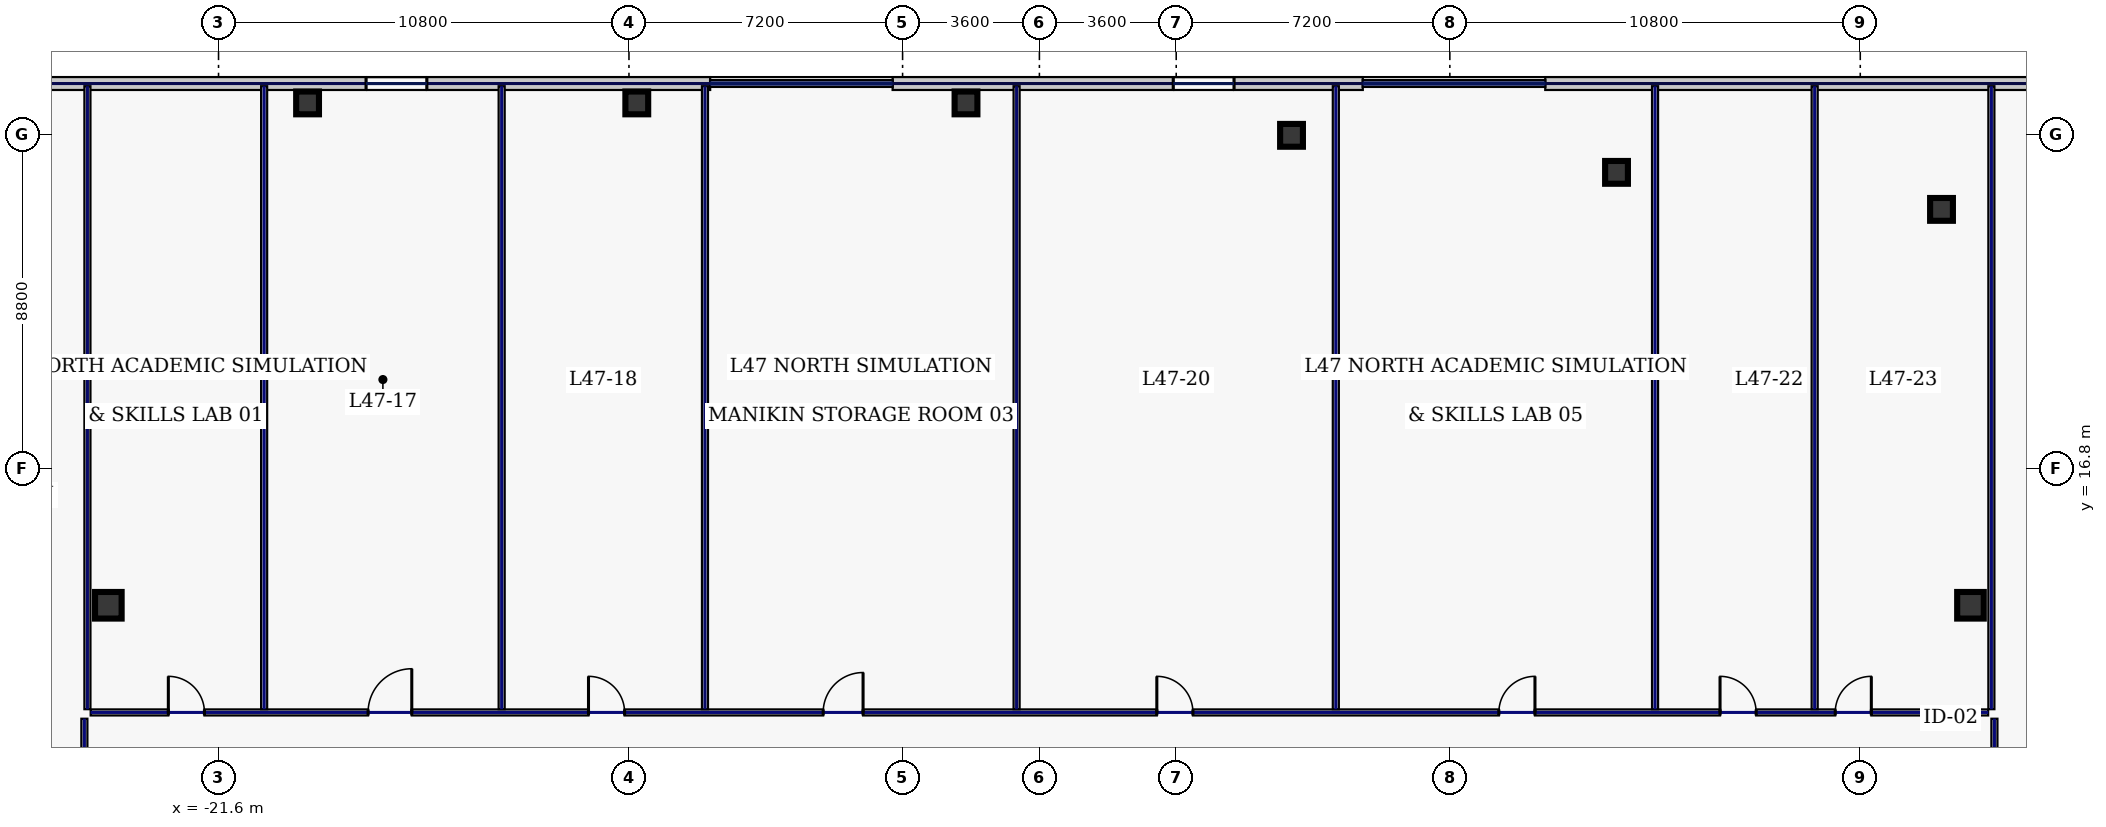
"""IFC4 building model, lengths in metres.
Left out: names, types, materials, properties, quantities, classifications, styles, units other than length and angle.
Written with IfcOpenShell. Run it as: python <this file> out.ifc"""

import sys

from ifc_helpers import new_model, si_unit, direction, frame, frame_2d, origin, origin_2d, place, context, subcontext, project, spatial, rectangle, hollow_rectangle, extrude, element, fill, save


model = new_model("IFC4")
c1 = context("Model", 3, precision=1e-05, world=origin(), true_north=direction((0.0, 1.0)))
c2 = subcontext(c1, "Body", "Model", "MODEL_VIEW")
j1 = project(units=[si_unit("LENGTHUNIT", "METRE"), si_unit("PLANEANGLEUNIT", "RADIAN")], contexts=[c1])
p1 = place(None, origin())
s1 = spatial("IfcSite", under=j1, at=p1, CompositionType="ELEMENT")
p2 = place(p1, origin())
s2 = spatial("IfcBuilding", under=s1, at=p2, CompositionType="ELEMENT")
p3 = place(p2, frame((0.0, 0.0, 204.2)))
s3 = spatial("IfcBuildingStorey", under=s2, at=p3, CompositionType="ELEMENT", Elevation=204.2)
for number, where, z_axis, x_axis in (
    (1, (-24.5, 13.2, 0.0), (0.0, 0.0, 1.0), (1.0, 0.0, 0.0)),
    (2, (24.5, 13.2, 0.0), (0.0, 0.0, 1.0), (1.0, 0.0, 0.0)),
):
    element("IfcColumn", number, at=place(p3, frame(where, z_axis=z_axis, x_axis=x_axis)), inside=s3, PredefinedType="COLUMN", context=c2, shape_type="SweptSolid", body=[
        extrude(hollow_rectangle(XDim=0.7, YDim=0.7, WallThickness=0.032, at=origin_2d()), origin(), (0.0, 0.0, 1.0), 3.68),
    ])
for number, where, z_axis, x_axis in (
    (3, (23.738, 23.618, 0.0), (0.0, 0.0, 1.0), (1.0, 0.0, 0.0)),
    (4, (15.186, 24.592, 0.0), (0.0, 0.0, 1.0), (1.0, 0.0, 0.0)),
    (5, (6.634, 25.567, 0.0), (0.0, 0.0, 1.0), (1.0, 0.0, 0.0)),
    (6, (-1.931, 26.42, 0.0), (0.0, 0.0, 1.0), (1.0, 0.0, 0.0)),
    (7, (-10.594, 26.42, 0.0), (0.0, 0.0, 1.0), (1.0, 0.0, 0.0)),
    (8, (-19.257, 26.42, 0.0), (0.0, 0.0, 1.0), (1.0, 0.0, 0.0)),
):
    element("IfcColumn", number, at=place(p3, frame(where, z_axis=z_axis, x_axis=x_axis)), inside=s3, PredefinedType="COLUMN", context=c2, shape_type="SweptSolid", body=[
        extrude(hollow_rectangle(XDim=0.6, YDim=0.6, WallThickness=0.028, at=origin_2d()), origin(), (0.0, 0.0, 1.0), 3.68),
    ])
p4 = place(p3, frame((33.4, 26.93, 0.0), z_axis=(0.0, 0.0, 1.0), x_axis=(-1.0, 0.0, 0.0)))
e9 = element("IfcWall", 9, at=p4, inside=s3, PredefinedType="STANDARD", context=c2, shape_type="SweptSolid", body=[
    extrude(rectangle(XDim=20.09, YDim=0.34, at=frame_2d((10.045, 0.0))), origin(), (0.0, 0.0, 1.0), 2.075),
])
p5 = place(p4, frame((2.691, 0.0, 0.22)))
e10 = element("IfcOpeningElement", 10, at=p5, cuts=e9, PredefinedType="OPENING", context=c2, shape_type="SweptSolid", body=[
    extrude(rectangle(XDim=1.6, YDim=1.2, at=frame_2d((0.8, 0.6))), frame((0.0, 0.18, 0.0), z_axis=(0.0, -1.0, 0.0), x_axis=(1.0, 0.0, 0.0)), (0.0, 0.0, 1.0), 0.36),
])
p6 = place(p3, frame((8.51, 26.93, 0.0), z_axis=(0.0, 0.0, 1.0), x_axis=(-1.0, 0.0, 0.0)))
e11 = element("IfcWall", 11, at=p6, inside=s3, PredefinedType="STANDARD", context=c2, shape_type="SweptSolid", body=[
    extrude(rectangle(XDim=12.373, YDim=0.34, at=frame_2d((6.187, 0.0))), origin(), (0.0, 0.0, 1.0), 2.075),
])
p7 = place(p6, frame((3.389, 0.0, 0.22)))
e12 = element("IfcOpeningElement", 12, at=p7, cuts=e11, PredefinedType="OPENING", context=c2, shape_type="SweptSolid", body=[
    extrude(rectangle(XDim=1.6, YDim=1.2, at=frame_2d((0.8, 0.6))), frame((0.0, 0.18, 0.0), z_axis=(0.0, -1.0, 0.0), x_axis=(1.0, 0.0, 0.0)), (0.0, 0.0, 1.0), 0.36),
])
p8 = place(p3, frame((-8.663, 26.93, 0.0), z_axis=(0.0, 0.0, 1.0), x_axis=(-1.0, 0.0, 0.0)))
e13 = element("IfcWall", 13, at=p8, inside=s3, PredefinedType="STANDARD", context=c2, shape_type="SweptSolid", body=[
    extrude(rectangle(XDim=19.937, YDim=0.34, at=frame_2d((9.969, 0.0))), origin(), (0.0, 0.0, 1.0), 3.68),
])
p9 = place(p8, frame((7.455, 0.0, 0.22)))
e14 = element("IfcOpeningElement", 14, at=p9, cuts=e13, PredefinedType="OPENING", context=c2, shape_type="SweptSolid", body=[
    extrude(rectangle(XDim=1.6, YDim=1.2, at=frame_2d((0.8, 0.6))), frame((0.0, 0.18, 0.0), z_axis=(0.0, -1.0, 0.0), x_axis=(1.0, 0.0, 0.0)), (0.0, 0.0, 1.0), 0.36),
])
p10 = place(p3, frame((-25.13, 2.585, 0.0), z_axis=(0.0, 0.0, 1.0), x_axis=(0.0, 1.0, 0.0)))
e15 = element("IfcWall", 15, at=p10, inside=s3, PredefinedType="PARTITIONING", context=c2, shape_type="SweptSolid", body=[
    extrude(rectangle(XDim=7.63, YDim=0.16, at=frame_2d((3.815, 0.0))), origin(), (0.0, 0.0, 1.0), 3.68),
])
p11 = place(p10, frame((2.345, 0.0, 0.0)))
e16 = element("IfcOpeningElement", 16, at=p11, cuts=e15, PredefinedType="OPENING", context=c2, shape_type="SweptSolid", body=[
    extrude(rectangle(XDim=0.95, YDim=2.2, at=frame_2d((0.475, 1.1))), frame((0.0, 0.09, 0.0), z_axis=(0.0, -1.0, 0.0), x_axis=(1.0, 0.0, 0.0)), (0.0, 0.0, 1.0), 0.18),
])
p12 = place(p3, frame((-24.965, 10.38, 0.0), z_axis=(0.0, 0.0, 1.0), x_axis=(1.0, 0.0, 0.0)))
e17 = element("IfcWall", 17, at=p12, inside=s3, PredefinedType="PARTITIONING", context=c2, shape_type="SweptSolid", body=[
    extrude(rectangle(XDim=49.93, YDim=0.16, at=frame_2d((24.965, 0.0))), origin(), (0.0, 0.0, 1.0), 3.68),
])
p13 = place(p12, frame((2.044, 0.0, 0.0)))
e18 = element("IfcOpeningElement", 18, at=p13, cuts=e17, PredefinedType="OPENING", context=c2, shape_type="SweptSolid", body=[
    extrude(rectangle(XDim=0.95, YDim=2.2, at=frame_2d((0.475, 1.1))), frame((0.0, 0.09, 0.0), z_axis=(0.0, -1.0, 0.0), x_axis=(1.0, 0.0, 0.0)), (0.0, 0.0, 1.0), 0.18),
])
p14 = place(p12, frame((7.3, 0.0, 0.0)))
e19 = element("IfcOpeningElement", 19, at=p14, cuts=e17, PredefinedType="OPENING", context=c2, shape_type="SweptSolid", body=[
    extrude(rectangle(XDim=1.15, YDim=2.2, at=frame_2d((0.575, 1.1))), frame((0.0, 0.09, 0.0), z_axis=(0.0, -1.0, 0.0), x_axis=(1.0, 0.0, 0.0)), (0.0, 0.0, 1.0), 0.18),
])
p15 = place(p12, frame((13.1, 0.0, 0.0)))
e20 = element("IfcOpeningElement", 20, at=p15, cuts=e17, PredefinedType="OPENING", context=c2, shape_type="SweptSolid", body=[
    extrude(rectangle(XDim=0.95, YDim=2.2, at=frame_2d((0.475, 1.1))), frame((0.0, 0.09, 0.0), z_axis=(0.0, -1.0, 0.0), x_axis=(1.0, 0.0, 0.0)), (0.0, 0.0, 1.0), 0.18),
])
p16 = place(p12, frame((19.275, 0.0, 0.0)))
e21 = element("IfcOpeningElement", 21, at=p16, cuts=e17, PredefinedType="OPENING", context=c2, shape_type="SweptSolid", body=[
    extrude(rectangle(XDim=1.05, YDim=2.2, at=frame_2d((0.525, 1.1))), frame((0.0, 0.09, 0.0), z_axis=(0.0, -1.0, 0.0), x_axis=(1.0, 0.0, 0.0)), (0.0, 0.0, 1.0), 0.18),
])
p17 = place(p12, frame((28.055, 0.0, 0.0)))
e22 = element("IfcOpeningElement", 22, at=p17, cuts=e17, PredefinedType="OPENING", context=c2, shape_type="SweptSolid", body=[
    extrude(rectangle(XDim=0.95, YDim=2.2, at=frame_2d((0.475, 1.1))), frame((0.0, 0.09, 0.0), z_axis=(0.0, -1.0, 0.0), x_axis=(1.0, 0.0, 0.0)), (0.0, 0.0, 1.0), 0.18),
])
p18 = place(p12, frame((37.055, 0.0, 0.0)))
e23 = element("IfcOpeningElement", 23, at=p18, cuts=e17, PredefinedType="OPENING", context=c2, shape_type="SweptSolid", body=[
    extrude(rectangle(XDim=0.95, YDim=2.2, at=frame_2d((0.475, 1.1))), frame((0.0, 0.09, 0.0), z_axis=(0.0, -1.0, 0.0), x_axis=(1.0, 0.0, 0.0)), (0.0, 0.0, 1.0), 0.18),
])
p19 = place(p12, frame((42.875, 0.0, 0.0)))
e24 = element("IfcOpeningElement", 24, at=p19, cuts=e17, PredefinedType="OPENING", context=c2, shape_type="SweptSolid", body=[
    extrude(rectangle(XDim=0.95, YDim=2.2, at=frame_2d((0.475, 1.1))), frame((0.0, 0.09, 0.0), z_axis=(0.0, -1.0, 0.0), x_axis=(1.0, 0.0, 0.0)), (0.0, 0.0, 1.0), 0.18),
])
p20 = place(p12, frame((45.906, 0.0, 0.0)))
e25 = element("IfcOpeningElement", 25, at=p20, cuts=e17, PredefinedType="OPENING", context=c2, shape_type="SweptSolid", body=[
    extrude(rectangle(XDim=0.95, YDim=2.2, at=frame_2d((0.475, 1.1))), frame((0.0, 0.09, 0.0), z_axis=(0.0, -1.0, 0.0), x_axis=(1.0, 0.0, 0.0)), (0.0, 0.0, 1.0), 0.18),
])
p21 = place(p3, frame((25.13, 10.215, 0.0), z_axis=(0.0, 0.0, 1.0), x_axis=(0.0, -1.0, 0.0)))
e26 = element("IfcWall", 26, at=p21, inside=s3, PredefinedType="PARTITIONING", context=c2, shape_type="SweptSolid", body=[
    extrude(rectangle(XDim=2.98, YDim=0.16, at=frame_2d((1.49, 0.0))), origin(), (0.0, 0.0, 1.0), 3.68),
])
p22 = place(p21, frame((1.1, 0.0, 0.0)))
e27 = element("IfcOpeningElement", 27, at=p22, cuts=e26, PredefinedType="OPENING", context=c2, shape_type="SweptSolid", body=[
    extrude(rectangle(XDim=0.95, YDim=2.2, at=frame_2d((0.475, 1.1))), frame((0.0, 0.09, 0.0), z_axis=(0.0, -1.0, 0.0), x_axis=(1.0, 0.0, 0.0)), (0.0, 0.0, 1.0), 0.18),
])
p23 = place(p3, frame((-25.05, 10.465, 0.0), z_axis=(0.0, 0.0, 1.0), x_axis=(0.0, 1.0, 0.0)))
e28 = element("IfcWall", 28, at=p23, inside=s3, PredefinedType="PARTITIONING", context=c2, shape_type="SweptSolid", body=[
    extrude(rectangle(XDim=16.395, YDim=0.16, at=frame_2d((8.198, 0.0))), origin(), (0.0, 0.0, 1.0), 1.475),
])
for number, where, z_axis, x_axis in (
    (29, (25.05, 10.465, 0.0), (0.0, 0.0, 1.0), (0.0, 1.0, 0.0)),
    (30, (-20.4, 10.465, 0.0), (0.0, 0.0, 1.0), (0.0, 1.0, 0.0)),
):
    element("IfcWall", number, at=place(p3, frame(where, z_axis=z_axis, x_axis=x_axis)), inside=s3, PredefinedType="PARTITIONING", context=c2, shape_type="SweptSolid", body=[
        extrude(rectangle(XDim=16.395, YDim=0.16, at=frame_2d((8.198, 0.0))), origin(), (0.0, 0.0, 1.0), 3.68),
    ])
for number, where, z_axis, x_axis in (
    (31, (-8.8, 10.465, 0.0), (0.0, 0.0, 1.0), (0.0, 1.0, 0.0)),
    (32, (-0.6, 10.465, 0.0), (0.0, 0.0, 1.0), (0.0, 1.0, 0.0)),
):
    element("IfcWall", number, at=place(p3, frame(where, z_axis=z_axis, x_axis=x_axis)), inside=s3, PredefinedType="PARTITIONING", context=c2, shape_type="SweptSolid", body=[
        extrude(rectangle(XDim=16.395, YDim=0.16, at=frame_2d((8.198, 0.0))), origin(), (0.0, 0.0, 1.0), 1.475),
    ])
for number, where, z_axis, x_axis in (
    (33, (7.8, 10.465, 0.0), (0.0, 0.0, 1.0), (0.0, 1.0, 0.0)),
    (34, (16.2, 10.465, 0.0), (0.0, 0.0, 1.0), (0.0, 1.0, 0.0)),
    (35, (20.4, 10.465, 0.0), (0.0, 0.0, 1.0), (0.0, 1.0, 0.0)),
    (36, (-14.15, 10.465, 0.0), (0.0, 0.0, 1.0), (0.0, 1.0, 0.0)),
):
    element("IfcWall", number, at=place(p3, frame(where, z_axis=z_axis, x_axis=x_axis)), inside=s3, PredefinedType="PARTITIONING", context=c2, shape_type="SweptSolid", body=[
        extrude(rectangle(XDim=16.395, YDim=0.16, at=frame_2d((8.198, 0.0))), origin(), (0.0, 0.0, 1.0), 3.68),
    ])
p24 = place(p7, origin())
e37 = element("IfcWindow", 37, at=p24, inside=s3, PartitioningType="SINGLE_PANEL", PredefinedType="WINDOW", context=c2, shape_type="SweptSolid", body=[
    extrude(rectangle(XDim=1.6, YDim=1.2, at=frame_2d((0.8, 0.6))), frame((0.0, 0.03, 0.0), z_axis=(0.0, -1.0, 0.0), x_axis=(1.0, 0.0, 0.0)), (0.0, 0.0, 1.0), 0.06),
])
fill(e12, e37)
p25 = place(p9, origin())
e38 = element("IfcWindow", 38, at=p25, inside=s3, PartitioningType="SINGLE_PANEL", PredefinedType="WINDOW", context=c2, shape_type="SweptSolid", body=[
    extrude(rectangle(XDim=1.6, YDim=1.2, at=frame_2d((0.8, 0.6))), frame((0.0, 0.03, 0.0), z_axis=(0.0, -1.0, 0.0), x_axis=(1.0, 0.0, 0.0)), (0.0, 0.0, 1.0), 0.06),
])
fill(e14, e38)
p26 = place(p13, origin())
e39 = element("IfcDoor", 39, at=p26, inside=s3, OperationType="SINGLE_SWING_LEFT", PredefinedType="DOOR", context=c2, shape_type="SweptSolid", body=[
    extrude(rectangle(XDim=0.95, YDim=2.2, at=frame_2d((0.475, 1.1))), frame((0.0, 0.025, 0.0), z_axis=(0.0, -1.0, 0.0), x_axis=(1.0, 0.0, 0.0)), (0.0, 0.0, 1.0), 0.05),
])
fill(e18, e39)
p27 = place(p14, origin())
e40 = element("IfcDoor", 40, at=p27, inside=s3, OperationType="SINGLE_SWING_RIGHT", PredefinedType="DOOR", context=c2, shape_type="SweptSolid", body=[
    extrude(rectangle(XDim=1.15, YDim=2.2, at=frame_2d((0.575, 1.1))), frame((0.0, 0.025, 0.0), z_axis=(0.0, -1.0, 0.0), x_axis=(1.0, 0.0, 0.0)), (0.0, 0.0, 1.0), 0.05),
])
fill(e19, e40)
p28 = place(p15, origin())
e41 = element("IfcDoor", 41, at=p28, inside=s3, OperationType="SINGLE_SWING_LEFT", PredefinedType="DOOR", context=c2, shape_type="SweptSolid", body=[
    extrude(rectangle(XDim=0.95, YDim=2.2, at=frame_2d((0.475, 1.1))), frame((0.0, 0.025, 0.0), z_axis=(0.0, -1.0, 0.0), x_axis=(1.0, 0.0, 0.0)), (0.0, 0.0, 1.0), 0.05),
])
fill(e20, e41)
p29 = place(p16, origin())
e42 = element("IfcDoor", 42, at=p29, inside=s3, OperationType="SINGLE_SWING_RIGHT", PredefinedType="DOOR", context=c2, shape_type="SweptSolid", body=[
    extrude(rectangle(XDim=1.05, YDim=2.2, at=frame_2d((0.525, 1.1))), frame((0.0, 0.025, 0.0), z_axis=(0.0, -1.0, 0.0), x_axis=(1.0, 0.0, 0.0)), (0.0, 0.0, 1.0), 0.05),
])
fill(e21, e42)
p30 = place(p17, origin())
e43 = element("IfcDoor", 43, at=p30, inside=s3, OperationType="SINGLE_SWING_LEFT", PredefinedType="DOOR", context=c2, shape_type="SweptSolid", body=[
    extrude(rectangle(XDim=0.95, YDim=2.2, at=frame_2d((0.475, 1.1))), frame((0.0, 0.025, 0.0), z_axis=(0.0, -1.0, 0.0), x_axis=(1.0, 0.0, 0.0)), (0.0, 0.0, 1.0), 0.05),
])
fill(e22, e43)
p31 = place(p18, origin())
e44 = element("IfcDoor", 44, at=p31, inside=s3, OperationType="SINGLE_SWING_RIGHT", PredefinedType="DOOR", context=c2, shape_type="SweptSolid", body=[
    extrude(rectangle(XDim=0.95, YDim=2.2, at=frame_2d((0.475, 1.1))), frame((0.0, 0.025, 0.0), z_axis=(0.0, -1.0, 0.0), x_axis=(1.0, 0.0, 0.0)), (0.0, 0.0, 1.0), 0.05),
])
fill(e23, e44)
p32 = place(p19, origin())
e45 = element("IfcDoor", 45, at=p32, inside=s3, OperationType="SINGLE_SWING_LEFT", PredefinedType="DOOR", context=c2, shape_type="SweptSolid", body=[
    extrude(rectangle(XDim=0.95, YDim=2.2, at=frame_2d((0.475, 1.1))), frame((0.0, 0.025, 0.0), z_axis=(0.0, -1.0, 0.0), x_axis=(1.0, 0.0, 0.0)), (0.0, 0.0, 1.0), 0.05),
])
fill(e24, e45)
p33 = place(p20, origin())
e46 = element("IfcDoor", 46, at=p33, inside=s3, OperationType="SINGLE_SWING_RIGHT", PredefinedType="DOOR", context=c2, shape_type="SweptSolid", body=[
    extrude(rectangle(XDim=0.95, YDim=2.2, at=frame_2d((0.475, 1.1))), frame((0.0, 0.025, 0.0), z_axis=(0.0, -1.0, 0.0), x_axis=(1.0, 0.0, 0.0)), (0.0, 0.0, 1.0), 0.05),
])
fill(e25, e46)
save(model, sys.argv[1])
